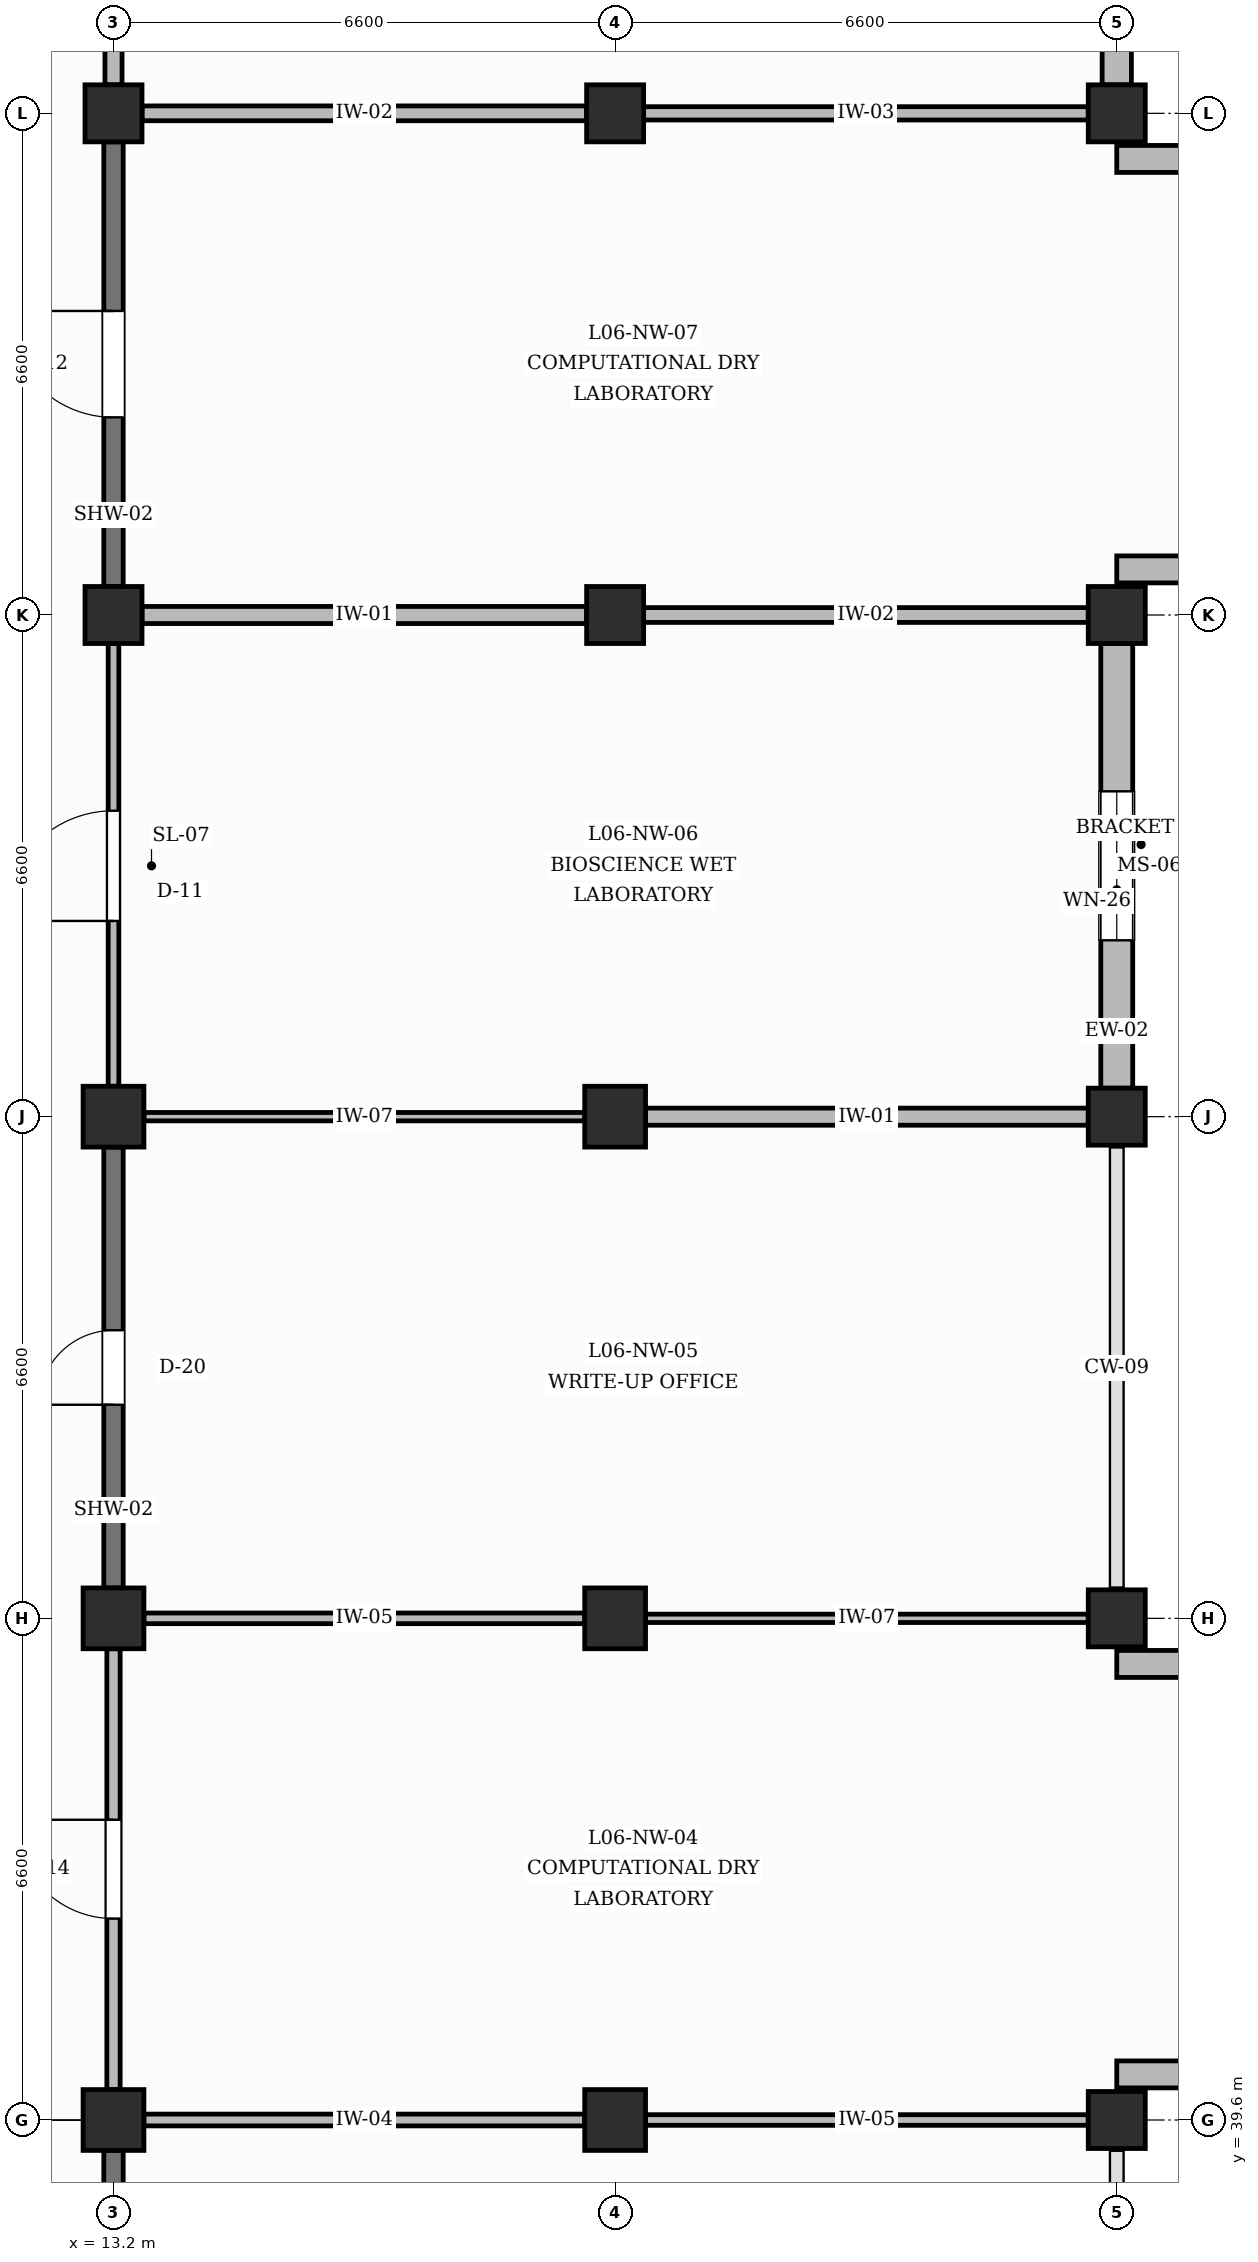
"""IFC4 building model, lengths in metres.
Left out: names, types, materials, properties, quantities, classifications, styles, units other than length and angle.
Written with IfcOpenShell. Run it as: python <this file> out.ifc"""

import sys

from ifc_helpers import new_model, si_unit, direction, frame, frame_2d, origin, origin_2d, place, context, subcontext, project, spatial, rectangle, extrude, element, fill, save


model = new_model("IFC4")
c1 = context("Model", 3, precision=1e-05, world=origin(), true_north=direction((0.0, 1.0)))
c2 = subcontext(c1, "Body", "Model", "MODEL_VIEW")
j1 = project(units=[si_unit("LENGTHUNIT", "METRE"), si_unit("PLANEANGLEUNIT", "RADIAN")], contexts=[c1])
p1 = place(None, origin())
s1 = spatial("IfcSite", under=j1, at=p1, CompositionType="ELEMENT")
p2 = place(p1, origin())
s2 = spatial("IfcBuilding", under=s1, at=p2, CompositionType="ELEMENT")
p3 = place(p2, frame((0.0, 0.0, 27.0)))
s3 = spatial("IfcBuildingStorey", under=s2, at=p3, CompositionType="ELEMENT", Elevation=27.0)
for number, where, z_axis, x_axis in (
    (1, (13.2, 39.6, 0.0), (0.0, 0.0, 1.0), (1.0, 0.0, 0.0)),
    (2, (13.2, 46.2, 0.0), (0.0, 0.0, 1.0), (1.0, 0.0, 0.0)),
    (3, (13.2, 52.8, 0.0), (0.0, 0.0, 1.0), (1.0, 0.0, 0.0)),
):
    element("IfcColumn", number, at=place(p3, frame(where, z_axis=z_axis, x_axis=x_axis)), inside=s3, PredefinedType="COLUMN", context=c2, shape_type="SweptSolid", body=[
        extrude(rectangle(XDim=0.8, YDim=0.8, at=origin_2d()), origin(), (0.0, 0.0, 1.0), 4.2),
    ])
for number, where, z_axis, x_axis in (
    (4, (13.2, 59.4, 0.0), (0.0, 0.0, 1.0), (1.0, 0.0, 0.0)),
    (5, (13.2, 66.0, 0.0), (0.0, 0.0, 1.0), (1.0, 0.0, 0.0)),
):
    element("IfcColumn", number, at=place(p3, frame(where, z_axis=z_axis, x_axis=x_axis)), inside=s3, PredefinedType="COLUMN", context=c2, shape_type="SweptSolid", body=[
        extrude(rectangle(XDim=0.75, YDim=0.75, at=origin_2d()), origin(), (0.0, 0.0, 1.0), 4.2),
    ])
for number, where, z_axis, x_axis in (
    (6, (19.8, 39.6, 0.0), (0.0, 0.0, 1.0), (1.0, 0.0, 0.0)),
    (7, (19.8, 46.2, 0.0), (0.0, 0.0, 1.0), (1.0, 0.0, 0.0)),
    (8, (19.8, 52.8, 0.0), (0.0, 0.0, 1.0), (1.0, 0.0, 0.0)),
):
    element("IfcColumn", number, at=place(p3, frame(where, z_axis=z_axis, x_axis=x_axis)), inside=s3, PredefinedType="COLUMN", context=c2, shape_type="SweptSolid", body=[
        extrude(rectangle(XDim=0.8, YDim=0.8, at=origin_2d()), origin(), (0.0, 0.0, 1.0), 4.2),
    ])
for number, where, z_axis, x_axis in (
    (9, (19.8, 59.4, 0.0), (0.0, 0.0, 1.0), (1.0, 0.0, 0.0)),
    (10, (19.8, 66.0, 0.0), (0.0, 0.0, 1.0), (1.0, 0.0, 0.0)),
    (11, (26.4, 39.6, 0.0), (0.0, 0.0, 1.0), (1.0, 0.0, 0.0)),
    (12, (26.4, 46.2, 0.0), (0.0, 0.0, 1.0), (1.0, 0.0, 0.0)),
    (13, (26.4, 52.8, 0.0), (0.0, 0.0, 1.0), (1.0, 0.0, 0.0)),
    (14, (26.4, 59.4, 0.0), (0.0, 0.0, 1.0), (1.0, 0.0, 0.0)),
    (15, (26.4, 66.0, 0.0), (0.0, 0.0, 1.0), (1.0, 0.0, 0.0)),
):
    element("IfcColumn", number, at=place(p3, frame(where, z_axis=z_axis, x_axis=x_axis)), inside=s3, PredefinedType="COLUMN", context=c2, shape_type="SweptSolid", body=[
        extrude(rectangle(XDim=0.75, YDim=0.75, at=origin_2d()), origin(), (0.0, 0.0, 1.0), 4.2),
    ])
for number, where, z_axis, x_axis in (
    (16, (26.4, 40.2, 0.0), (0.0, 0.0, 1.0), (1.0, 0.0, 0.0)),
    (17, (26.4, 45.6, 0.0), (0.0, 0.0, 1.0), (1.0, 0.0, 0.0)),
):
    element("IfcWall", number, at=place(p3, frame(where, z_axis=z_axis, x_axis=x_axis)), inside=s3, PredefinedType="SOLIDWALL", context=c2, shape_type="SweptSolid", body=[
        extrude(rectangle(XDim=2.0, YDim=0.355, at=frame_2d((1.0, 0.0))), origin(), (0.0, 0.0, 1.0), 3.27),
    ])
p4 = place(p3, frame((26.4, 53.175, 0.0), z_axis=(0.0, 0.0, 1.0), x_axis=(0.0, 1.0, 0.0)))
e18 = element("IfcWall", 18, at=p4, inside=s3, PredefinedType="SOLIDWALL", context=c2, shape_type="SweptSolid", body=[
    extrude(rectangle(XDim=5.85, YDim=0.42, at=frame_2d((2.925, 0.0))), origin(), (0.0, 0.0, 1.0), 3.27),
])
p5 = place(p4, frame((1.945, 0.0, 0.95)))
e19 = element("IfcOpeningElement", 19, at=p5, cuts=e18, PredefinedType="OPENING", context=c2, shape_type="SweptSolid", body=[
    extrude(rectangle(XDim=1.96, YDim=1.52, at=frame_2d((0.98, 0.76))), frame((0.0, 0.22, 0.0), z_axis=(0.0, -1.0, 0.0), x_axis=(1.0, 0.0, 0.0)), (0.0, 0.0, 1.0), 0.44),
])
for number, where, z_axis, x_axis in (
    (20, (26.4, 60.0, 0.0), (0.0, 0.0, 1.0), (1.0, 0.0, 0.0)),
    (21, (26.4, 65.4, 0.0), (0.0, 0.0, 1.0), (1.0, 0.0, 0.0)),
):
    element("IfcWall", number, at=place(p3, frame(where, z_axis=z_axis, x_axis=x_axis)), inside=s3, PredefinedType="SOLIDWALL", context=c2, shape_type="SweptSolid", body=[
        extrude(rectangle(XDim=2.0, YDim=0.355, at=frame_2d((1.0, 0.0))), origin(), (0.0, 0.0, 1.0), 3.27),
    ])
p6 = place(p3, frame((26.4, 66.375, 0.0), z_axis=(0.0, 0.0, 1.0), x_axis=(0.0, 1.0, 0.0)))
e22 = element("IfcWall", 22, at=p6, inside=s3, PredefinedType="SOLIDWALL", context=c2, shape_type="SweptSolid", body=[
    extrude(rectangle(XDim=5.85, YDim=0.385, at=frame_2d((2.925, 0.0))), origin(), (0.0, 0.0, 1.0), 3.27),
])
p7 = place(p6, frame((1.945, 0.0, 0.95)))
e23 = element("IfcOpeningElement", 23, at=p7, cuts=e22, PredefinedType="OPENING", context=c2, shape_type="SweptSolid", body=[
    extrude(rectangle(XDim=1.96, YDim=1.74, at=frame_2d((0.98, 0.87))), frame((0.0, 0.202, 0.0), z_axis=(0.0, -1.0, 0.0), x_axis=(1.0, 0.0, 0.0)), (0.0, 0.0, 1.0), 0.405),
])
p8 = place(p3, frame((13.2, 33.4, 0.0), z_axis=(0.0, 0.0, 1.0), x_axis=(0.0, 1.0, 0.0)))
e24 = element("IfcWall", 24, at=p8, inside=s3, PredefinedType="SHEAR", context=c2, shape_type="SweptSolid", body=[
    extrude(rectangle(XDim=5.8, YDim=0.255, at=frame_2d((2.9, 0.0))), origin(), (0.0, 0.0, 1.0), 3.17),
])
p9 = place(p8, frame((2.225, 0.0, 0.0)))
e25 = element("IfcOpeningElement", 25, at=p9, cuts=e24, PredefinedType="OPENING", context=c2, shape_type="SweptSolid", body=[
    extrude(rectangle(XDim=1.35, YDim=2.3, at=frame_2d((0.675, 1.15))), frame((0.0, 0.137, 0.0), z_axis=(0.0, -1.0, 0.0), x_axis=(1.0, 0.0, 0.0)), (0.0, 0.0, 1.0), 0.275),
])
p10 = place(p3, frame((13.2, 40.0, 0.0), z_axis=(0.0, 0.0, 1.0), x_axis=(0.0, 1.0, 0.0)))
e26 = element("IfcWall", 26, at=p10, inside=s3, PredefinedType="PARTITIONING", context=c2, shape_type="SweptSolid", body=[
    extrude(rectangle(XDim=5.8, YDim=0.175, at=frame_2d((2.9, 0.0))), origin(), (0.0, 0.0, 1.0), 3.17),
])
p11 = place(p10, frame((2.25, 0.0, 0.0)))
e27 = element("IfcOpeningElement", 27, at=p11, cuts=e26, PredefinedType="OPENING", context=c2, shape_type="SweptSolid", body=[
    extrude(rectangle(XDim=1.3, YDim=2.3, at=frame_2d((0.65, 1.15))), frame((0.0, 0.097, 0.0), z_axis=(0.0, -1.0, 0.0), x_axis=(1.0, 0.0, 0.0)), (0.0, 0.0, 1.0), 0.195),
])
p12 = place(p3, frame((13.2, 46.6, 0.0), z_axis=(0.0, 0.0, 1.0), x_axis=(0.0, 1.0, 0.0)))
e28 = element("IfcWall", 28, at=p12, inside=s3, PredefinedType="SHEAR", context=c2, shape_type="SweptSolid", body=[
    extrude(rectangle(XDim=5.8, YDim=0.255, at=frame_2d((2.9, 0.0))), origin(), (0.0, 0.0, 1.0), 3.17),
])
p13 = place(p12, frame((2.41, 0.0, 0.0)))
e29 = element("IfcOpeningElement", 29, at=p13, cuts=e28, PredefinedType="OPENING", context=c2, shape_type="SweptSolid", body=[
    extrude(rectangle(XDim=0.98, YDim=2.15, at=frame_2d((0.49, 1.075))), frame((0.0, 0.137, 0.0), z_axis=(0.0, -1.0, 0.0), x_axis=(1.0, 0.0, 0.0)), (0.0, 0.0, 1.0), 0.275),
])
p14 = place(p3, frame((13.2, 53.2, 0.0), z_axis=(0.0, 0.0, 1.0), x_axis=(0.0, 1.0, 0.0)))
e30 = element("IfcWall", 30, at=p14, inside=s3, PredefinedType="PARTITIONING", context=c2, shape_type="SweptSolid", body=[
    extrude(rectangle(XDim=5.825, YDim=0.14, at=frame_2d((2.913, 0.0))), origin(), (0.0, 0.0, 1.0), 3.17),
])
p15 = place(p14, frame((2.175, 0.0, 0.0)))
e31 = element("IfcOpeningElement", 31, at=p15, cuts=e30, PredefinedType="OPENING", context=c2, shape_type="SweptSolid", body=[
    extrude(rectangle(XDim=1.45, YDim=2.25, at=frame_2d((0.725, 1.125))), frame((0.0, 0.08, 0.0), z_axis=(0.0, -1.0, 0.0), x_axis=(1.0, 0.0, 0.0)), (0.0, 0.0, 1.0), 0.16),
])
p16 = place(p3, frame((13.2, 59.775, 0.0), z_axis=(0.0, 0.0, 1.0), x_axis=(0.0, 1.0, 0.0)))
e32 = element("IfcWall", 32, at=p16, inside=s3, PredefinedType="SHEAR", context=c2, shape_type="SweptSolid", body=[
    extrude(rectangle(XDim=5.85, YDim=0.255, at=frame_2d((2.925, 0.0))), origin(), (0.0, 0.0, 1.0), 3.17),
])
p17 = place(p16, frame((2.225, 0.0, 0.0)))
e33 = element("IfcOpeningElement", 33, at=p17, cuts=e32, PredefinedType="OPENING", context=c2, shape_type="SweptSolid", body=[
    extrude(rectangle(XDim=1.4, YDim=2.25, at=frame_2d((0.7, 1.125))), frame((0.0, 0.137, 0.0), z_axis=(0.0, -1.0, 0.0), x_axis=(1.0, 0.0, 0.0)), (0.0, 0.0, 1.0), 0.275),
])
p18 = place(p3, frame((13.2, 66.375, 0.0), z_axis=(0.0, 0.0, 1.0), x_axis=(0.0, 1.0, 0.0)))
e34 = element("IfcWall", 34, at=p18, inside=s3, PredefinedType="PARTITIONING", context=c2, shape_type="SweptSolid", body=[
    extrude(rectangle(XDim=5.85, YDim=0.225, at=frame_2d((2.925, 0.0))), origin(), (0.0, 0.0, 1.0), 3.17),
])
p19 = place(p18, frame((2.365, 0.0, 0.0)))
e35 = element("IfcOpeningElement", 35, at=p19, cuts=e34, PredefinedType="OPENING", context=c2, shape_type="SweptSolid", body=[
    extrude(rectangle(XDim=1.12, YDim=2.2, at=frame_2d((0.56, 1.1))), frame((0.0, 0.123, 0.0), z_axis=(0.0, -1.0, 0.0), x_axis=(1.0, 0.0, 0.0)), (0.0, 0.0, 1.0), 0.245),
])
p20 = place(p3, frame((13.6, 39.6, 0.0), z_axis=(0.0, 0.0, 1.0), x_axis=(1.0, 0.0, 0.0)))
e36 = element("IfcWall", 36, at=p20, inside=s3, PredefinedType="PARTITIONING", context=c2, shape_type="SweptSolid", body=[
    extrude(rectangle(XDim=5.8, YDim=0.155, at=frame_2d((2.9, 0.0))), origin(), (0.0, 0.0, 1.0), 3.17),
])
p21 = place(p3, frame((13.6, 46.2, 0.0), z_axis=(0.0, 0.0, 1.0), x_axis=(1.0, 0.0, 0.0)))
e37 = element("IfcWall", 37, at=p21, inside=s3, PredefinedType="PARTITIONING", context=c2, shape_type="SweptSolid", body=[
    extrude(rectangle(XDim=5.8, YDim=0.14, at=frame_2d((2.9, 0.0))), origin(), (0.0, 0.0, 1.0), 3.17),
])
p22 = place(p3, frame((13.6, 52.8, 0.0), z_axis=(0.0, 0.0, 1.0), x_axis=(1.0, 0.0, 0.0)))
e38 = element("IfcWall", 38, at=p22, inside=s3, PredefinedType="PARTITIONING", context=c2, shape_type="SweptSolid", body=[
    extrude(rectangle(XDim=5.8, YDim=0.11, at=frame_2d((2.9, 0.0))), origin(), (0.0, 0.0, 1.0), 3.17),
])
p23 = place(p3, frame((13.575, 59.4, 0.0), z_axis=(0.0, 0.0, 1.0), x_axis=(1.0, 0.0, 0.0)))
e39 = element("IfcWall", 39, at=p23, inside=s3, PredefinedType="PARTITIONING", context=c2, shape_type="SweptSolid", body=[
    extrude(rectangle(XDim=5.85, YDim=0.225, at=frame_2d((2.925, 0.0))), origin(), (0.0, 0.0, 1.0), 3.17),
])
p24 = place(p3, frame((13.575, 66.0, 0.0), z_axis=(0.0, 0.0, 1.0), x_axis=(1.0, 0.0, 0.0)))
e40 = element("IfcWall", 40, at=p24, inside=s3, PredefinedType="PARTITIONING", context=c2, shape_type="SweptSolid", body=[
    extrude(rectangle(XDim=5.85, YDim=0.195, at=frame_2d((2.925, 0.0))), origin(), (0.0, 0.0, 1.0), 3.17),
])
p25 = place(p3, frame((20.2, 39.6, 0.0), z_axis=(0.0, 0.0, 1.0), x_axis=(1.0, 0.0, 0.0)))
e41 = element("IfcWall", 41, at=p25, inside=s3, PredefinedType="PARTITIONING", context=c2, shape_type="SweptSolid", body=[
    extrude(rectangle(XDim=5.825, YDim=0.14, at=frame_2d((2.913, 0.0))), origin(), (0.0, 0.0, 1.0), 3.42),
])
p26 = place(p3, frame((20.2, 46.2, 0.0), z_axis=(0.0, 0.0, 1.0), x_axis=(1.0, 0.0, 0.0)))
e42 = element("IfcWall", 42, at=p26, inside=s3, PredefinedType="PARTITIONING", context=c2, shape_type="SweptSolid", body=[
    extrude(rectangle(XDim=5.825, YDim=0.11, at=frame_2d((2.913, 0.0))), origin(), (0.0, 0.0, 1.0), 3.42),
])
p27 = place(p3, frame((20.2, 52.8, 0.0), z_axis=(0.0, 0.0, 1.0), x_axis=(1.0, 0.0, 0.0)))
e43 = element("IfcWall", 43, at=p27, inside=s3, PredefinedType="PARTITIONING", context=c2, shape_type="SweptSolid", body=[
    extrude(rectangle(XDim=5.825, YDim=0.225, at=frame_2d((2.913, 0.0))), origin(), (0.0, 0.0, 1.0), 3.17),
])
p28 = place(p3, frame((20.175, 59.4, 0.0), z_axis=(0.0, 0.0, 1.0), x_axis=(1.0, 0.0, 0.0)))
e44 = element("IfcWall", 44, at=p28, inside=s3, PredefinedType="PARTITIONING", context=c2, shape_type="SweptSolid", body=[
    extrude(rectangle(XDim=5.85, YDim=0.195, at=frame_2d((2.925, 0.0))), origin(), (0.0, 0.0, 1.0), 3.42),
])
p29 = place(p3, frame((20.175, 66.0, 0.0), z_axis=(0.0, 0.0, 1.0), x_axis=(1.0, 0.0, 0.0)))
e45 = element("IfcWall", 45, at=p29, inside=s3, PredefinedType="PARTITIONING", context=c2, shape_type="SweptSolid", body=[
    extrude(rectangle(XDim=5.85, YDim=0.175, at=frame_2d((2.925, 0.0))), origin(), (0.0, 0.0, 1.0), 3.42),
])
p30 = place(p5, origin())
e46 = element("IfcWindow", 46, at=p30, inside=s3, PartitioningType="DOUBLE_PANEL_VERTICAL", PredefinedType="WINDOW", context=c2, shape_type="SweptSolid", body=[
    extrude(rectangle(XDim=1.96, YDim=1.52, at=frame_2d((0.98, 0.76))), frame((0.0, 0.03, 0.0), z_axis=(0.0, -1.0, 0.0), x_axis=(1.0, 0.0, 0.0)), (0.0, 0.0, 1.0), 0.06),
])
fill(e19, e46)
p31 = place(p11, origin())
e47 = element("IfcDoor", 47, at=p31, inside=s3, OperationType="SINGLE_SWING_RIGHT", PredefinedType="DOOR", context=c2, shape_type="SweptSolid", body=[
    extrude(rectangle(XDim=1.3, YDim=2.3, at=frame_2d((0.65, 1.15))), frame((0.0, 0.025, 0.0), z_axis=(0.0, -1.0, 0.0), x_axis=(1.0, 0.0, 0.0)), (0.0, 0.0, 1.0), 0.05),
])
fill(e27, e47)
p32 = place(p13, origin())
e48 = element("IfcDoor", 48, at=p32, inside=s3, OperationType="SINGLE_SWING_LEFT", PredefinedType="DOOR", context=c2, shape_type="SweptSolid", body=[
    extrude(rectangle(XDim=0.98, YDim=2.15, at=frame_2d((0.49, 1.075))), frame((0.0, 0.025, 0.0), z_axis=(0.0, -1.0, 0.0), x_axis=(1.0, 0.0, 0.0)), (0.0, 0.0, 1.0), 0.05),
])
fill(e29, e48)
p33 = place(p15, origin())
e49 = element("IfcDoor", 49, at=p33, inside=s3, OperationType="SINGLE_SWING_LEFT", PredefinedType="DOOR", context=c2, shape_type="SweptSolid", body=[
    extrude(rectangle(XDim=1.45, YDim=2.25, at=frame_2d((0.725, 1.125))), frame((0.0, 0.025, 0.0), z_axis=(0.0, -1.0, 0.0), x_axis=(1.0, 0.0, 0.0)), (0.0, 0.0, 1.0), 0.05),
])
fill(e31, e49)
p34 = place(p17, origin())
e50 = element("IfcDoor", 50, at=p34, inside=s3, OperationType="SINGLE_SWING_RIGHT", PredefinedType="DOOR", context=c2, shape_type="SweptSolid", body=[
    extrude(rectangle(XDim=1.4, YDim=2.25, at=frame_2d((0.7, 1.125))), frame((0.0, 0.025, 0.0), z_axis=(0.0, -1.0, 0.0), x_axis=(1.0, 0.0, 0.0)), (0.0, 0.0, 1.0), 0.05),
])
fill(e33, e50)
save(model, sys.argv[1])
